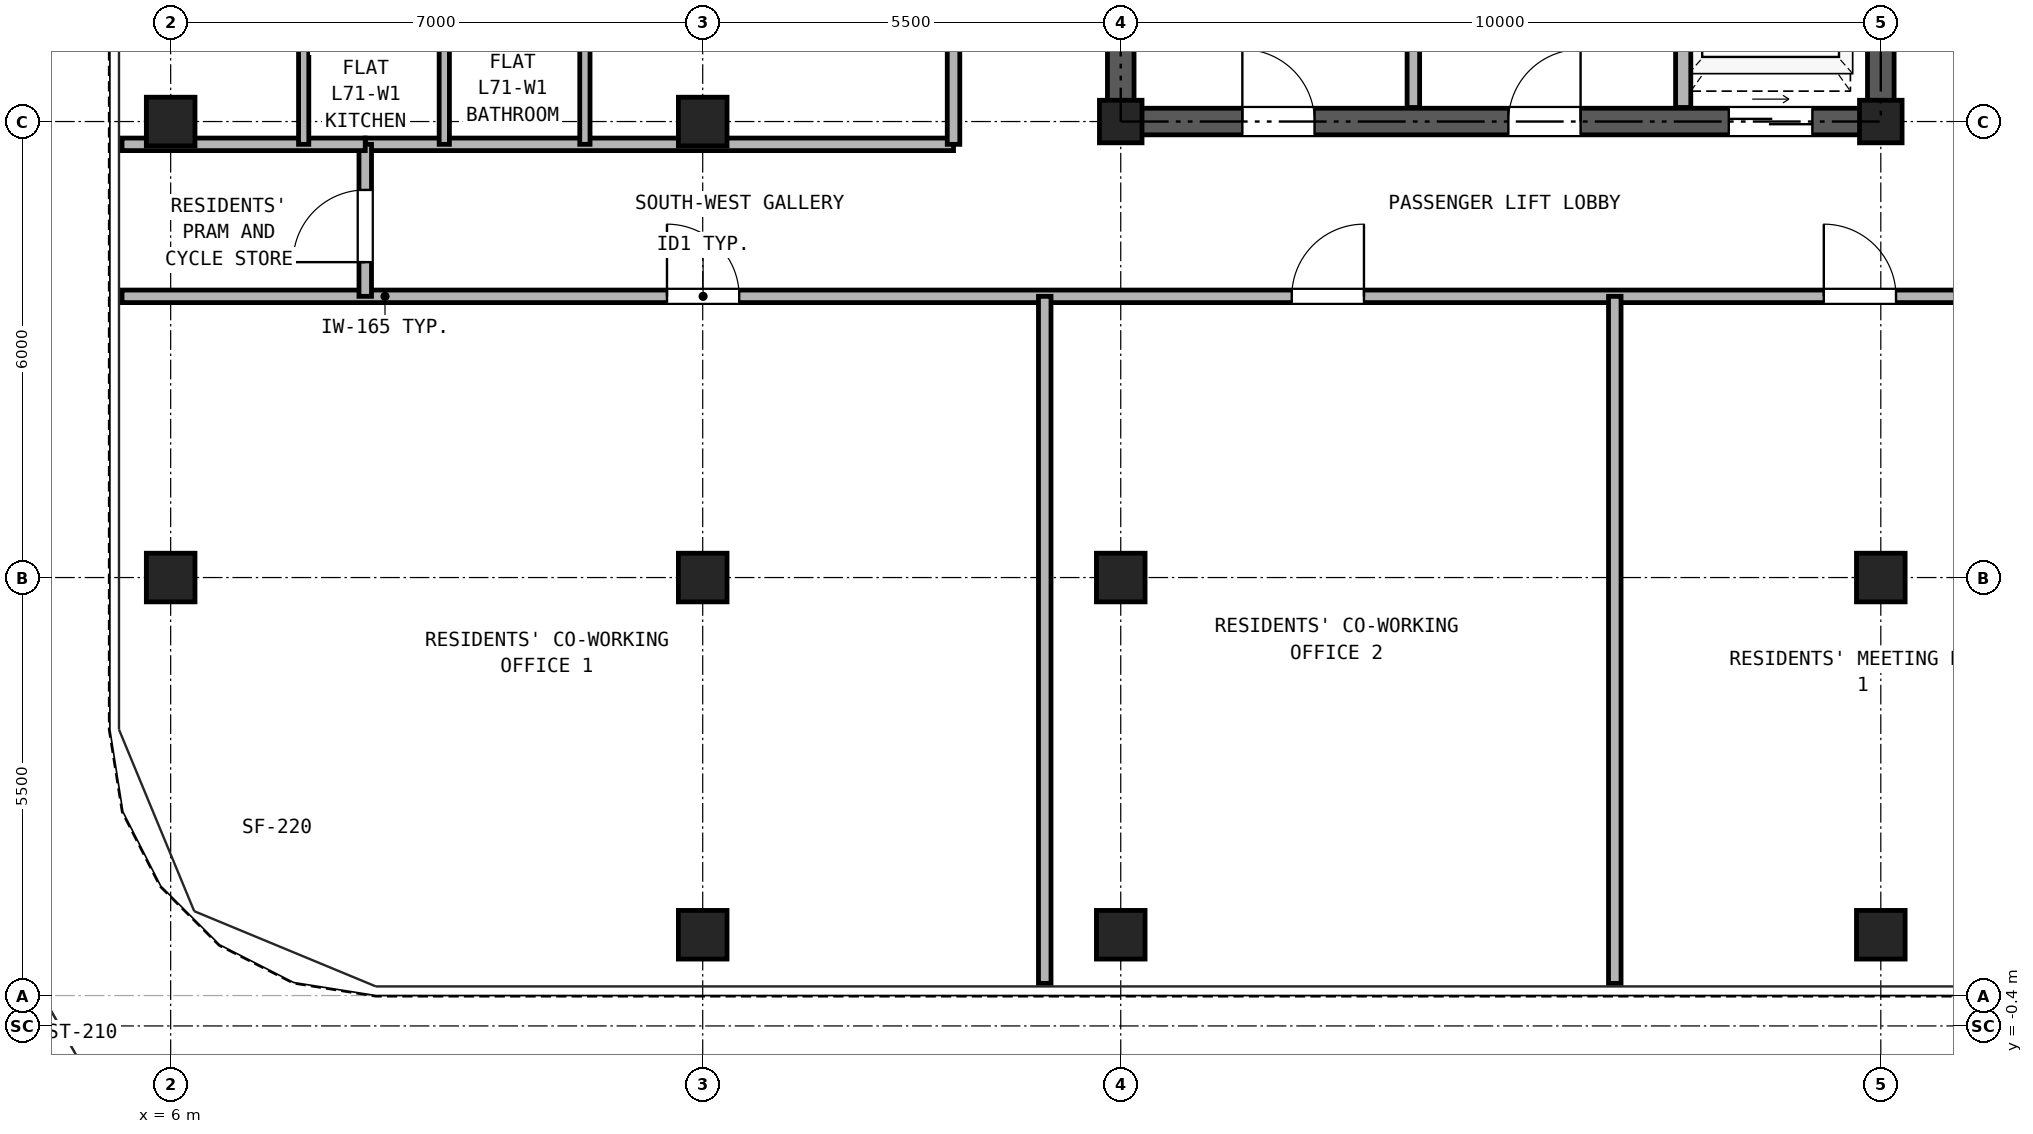
"""IFC4 building model, lengths in metres.
Left out: names, types, materials, properties, quantities, classifications, styles, units other than length and angle.
Written with IfcOpenShell. Run it as: python <this file> out.ifc"""

import sys

from ifc_helpers import new_model, si_unit, direction, frame, frame_2d, origin, origin_2d, place, context, subcontext, project, spatial, rectangle, hollow_rectangle, extrude, source, transform, mapped, element, fill, save


model = new_model("IFC4")
c1 = context("Model", 3, precision=1e-05, world=origin(), true_north=direction((0.0, 1.0)))
c2 = subcontext(c1, "Body", "Model", "MODEL_VIEW")
j1 = project(units=[si_unit("LENGTHUNIT", "METRE"), si_unit("PLANEANGLEUNIT", "RADIAN")], contexts=[c1])
p1 = place(None, origin())
s1 = spatial("IfcSite", under=j1, at=p1, CompositionType="ELEMENT")
p2 = place(p1, origin())
s2 = spatial("IfcBuilding", under=s1, at=p2, CompositionType="ELEMENT")
p3 = place(p2, frame((0.0, 0.0, 248.9)))
s3 = spatial("IfcBuildingStorey", under=s2, at=p3, CompositionType="ELEMENT", Elevation=248.9)
m1 = source(origin(), c2, "Body", "SweptSolid", [
    extrude(hollow_rectangle(XDim=0.64, YDim=0.64, WallThickness=0.035, at=origin_2d()), origin(), (0.0, 0.0, 1.0), 2.98),
])
for number, where, z_axis, x_axis in (
    (1, (13.0, 0.8, 0.0), (0.0, 0.0, 1.0), (1.0, 0.0, 0.0)),
    (2, (18.5, 0.8, 0.0), (0.0, 0.0, 1.0), (1.0, 0.0, 0.0)),
    (3, (28.5, 0.8, 0.0), (0.0, 0.0, 1.0), (1.0, 0.0, 0.0)),
    (4, (6.0, 5.5, 0.0), (0.0, 0.0, 1.0), (1.0, 0.0, 0.0)),
    (5, (6.0, 11.5, 0.0), (0.0, 0.0, 1.0), (1.0, 0.0, 0.0)),
    (6, (13.0, 5.5, 0.0), (0.0, 0.0, 1.0), (1.0, 0.0, 0.0)),
    (7, (13.0, 11.5, 0.0), (0.0, 0.0, 1.0), (1.0, 0.0, 0.0)),
    (8, (18.5, 5.5, 0.0), (0.0, 0.0, 1.0), (1.0, 0.0, 0.0)),
):
    element("IfcColumn", number, at=place(p3, frame(where, z_axis=z_axis, x_axis=x_axis)), inside=s3, PredefinedType="COLUMN", context=c2, shape_type="MappedRepresentation", body=[
        mapped(m1, transform((0.0, 0.0, 0.0), x_axis=(1.0, 0.0, 0.0), y_axis=(0.0, 1.0, 0.0), z_axis=(0.0, 0.0, 1.0), scale=1.0)),
    ])
m2 = source(origin(), c2, "Body", "SweptSolid", [
    extrude(hollow_rectangle(XDim=0.56, YDim=0.56, WallThickness=0.03, at=origin_2d()), origin(), (0.0, 0.0, 1.0), 2.98),
])
p4 = place(p3, frame((18.5, 11.5, 0.0), z_axis=(0.0, 0.0, 1.0), x_axis=(1.0, 0.0, 0.0)))
e9 = element("IfcColumn", 9, at=p4, inside=s3, PredefinedType="COLUMN", context=c2, shape_type="MappedRepresentation", body=[
    mapped(m2, transform((0.0, 0.0, 0.0), x_axis=(1.0, 0.0, 0.0), y_axis=(0.0, 1.0, 0.0), z_axis=(0.0, 0.0, 1.0), scale=1.0)),
])
p5 = place(p3, frame((28.5, 5.5, 0.0), z_axis=(0.0, 0.0, 1.0), x_axis=(1.0, 0.0, 0.0)))
e10 = element("IfcColumn", 10, at=p5, inside=s3, PredefinedType="COLUMN", context=c2, shape_type="MappedRepresentation", body=[
    mapped(m1, transform((0.0, 0.0, 0.0), x_axis=(1.0, 0.0, 0.0), y_axis=(0.0, 1.0, 0.0), z_axis=(0.0, 0.0, 1.0), scale=1.0)),
])
p6 = place(p3, frame((28.5, 11.5, 0.0), z_axis=(0.0, 0.0, 1.0), x_axis=(1.0, 0.0, 0.0)))
e11 = element("IfcColumn", 11, at=p6, inside=s3, PredefinedType="COLUMN", context=c2, shape_type="MappedRepresentation", body=[
    mapped(m2, transform((0.0, 0.0, 0.0), x_axis=(1.0, 0.0, 0.0), y_axis=(0.0, 1.0, 0.0), z_axis=(0.0, 0.0, 1.0), scale=1.0)),
])
p7 = place(p3, frame((18.325, 11.5, 0.0), z_axis=(0.0, 0.0, 1.0), x_axis=(1.0, 0.0, 0.0)))
e12 = element("IfcWall", 12, at=p7, inside=s3, PredefinedType="SHEAR", context=c2, shape_type="SweptSolid", body=[
    extrude(rectangle(XDim=10.35, YDim=0.35, at=frame_2d((5.175, 0.0))), origin(), (0.0, 0.0, 1.0), 2.98),
])
p8 = place(p7, frame((1.775, 0.0, 0.0)))
e13 = element("IfcOpeningElement", 13, at=p8, cuts=e12, PredefinedType="OPENING", context=c2, shape_type="SweptSolid", body=[
    extrude(rectangle(XDim=0.95, YDim=2.15, at=frame_2d((0.475, 1.075))), frame((0.0, 0.185, 0.0), z_axis=(0.0, -1.0, 0.0), x_axis=(1.0, 0.0, 0.0)), (0.0, 0.0, 1.0), 0.37),
])
p9 = place(p7, frame((5.275, 0.0, 0.0)))
e14 = element("IfcOpeningElement", 14, at=p9, cuts=e12, PredefinedType="OPENING", context=c2, shape_type="SweptSolid", body=[
    extrude(rectangle(XDim=0.95, YDim=2.15, at=frame_2d((0.475, 1.075))), frame((0.0, 0.185, 0.0), z_axis=(0.0, -1.0, 0.0), x_axis=(1.0, 0.0, 0.0)), (0.0, 0.0, 1.0), 0.37),
])
p10 = place(p7, frame((8.175, 0.0, 0.0)))
e15 = element("IfcOpeningElement", 15, at=p10, cuts=e12, PredefinedType="OPENING", context=c2, shape_type="SweptSolid", body=[
    extrude(rectangle(XDim=1.1, YDim=2.25, at=frame_2d((0.55, 1.125))), frame((0.0, 0.185, 0.0), z_axis=(0.0, -1.0, 0.0), x_axis=(1.0, 0.0, 0.0)), (0.0, 0.0, 1.0), 0.37),
])
p11 = place(p3, frame((18.5, 11.675, 0.0), z_axis=(0.0, 0.0, 1.0), x_axis=(0.0, 1.0, 0.0)))
e16 = element("IfcWall", 16, at=p11, inside=s3, PredefinedType="SHEAR", context=c2, shape_type="SweptSolid", body=[
    extrude(rectangle(XDim=16.9, YDim=0.35, at=frame_2d((8.45, 0.0))), origin(), (0.0, 0.0, 1.0), 2.98),
])
p12 = place(p11, frame((7.475, 0.0, 0.0)))
e17 = element("IfcOpeningElement", 17, at=p12, cuts=e16, PredefinedType="OPENING", context=c2, shape_type="SweptSolid", body=[
    extrude(rectangle(XDim=1.15, YDim=2.2, at=frame_2d((0.575, 1.1))), frame((0.0, 0.185, 0.0), z_axis=(0.0, -1.0, 0.0), x_axis=(1.0, 0.0, 0.0)), (0.0, 0.0, 1.0), 0.37),
])
p13 = place(p3, frame((28.5, 11.675, 0.0), z_axis=(0.0, 0.0, 1.0), x_axis=(0.0, 1.0, 0.0)))
e18 = element("IfcWall", 18, at=p13, inside=s3, PredefinedType="SHEAR", context=c2, shape_type="SweptSolid", body=[
    extrude(rectangle(XDim=16.9, YDim=0.35, at=frame_2d((8.45, 0.0))), origin(), (0.0, 0.0, 1.0), 2.98),
])
p14 = place(p13, frame((7.475, 0.0, 0.0)))
e19 = element("IfcOpeningElement", 19, at=p14, cuts=e18, PredefinedType="OPENING", context=c2, shape_type="SweptSolid", body=[
    extrude(rectangle(XDim=1.15, YDim=2.2, at=frame_2d((0.575, 1.1))), frame((0.0, 0.185, 0.0), z_axis=(0.0, -1.0, 0.0), x_axis=(1.0, 0.0, 0.0)), (0.0, 0.0, 1.0), 0.37),
])
p15 = place(p3, frame((22.35, 11.685, 0.0), z_axis=(0.0, 0.0, 1.0), x_axis=(0.0, 1.0, 0.0)))
e20 = element("IfcWall", 20, at=p15, inside=s3, PredefinedType="PARTITIONING", context=c2, shape_type="SweptSolid", body=[
    extrude(rectangle(XDim=3.315, YDim=0.165, at=frame_2d((1.657, 0.0))), origin(), (0.0, 0.0, 1.0), 2.98),
])
p16 = place(p3, frame((25.9, 11.685, 0.0), z_axis=(0.0, 0.0, 1.0), x_axis=(0.0, 1.0, 0.0)))
e21 = element("IfcWall", 21, at=p16, inside=s3, PredefinedType="PARTITIONING", context=c2, shape_type="SweptSolid", body=[
    extrude(rectangle(XDim=3.315, YDim=0.2, at=frame_2d((1.657, 0.0))), origin(), (0.0, 0.0, 1.0), 2.98),
])
p17 = place(p3, frame((5.36, 9.2, 0.0), z_axis=(0.0, 0.0, 1.0), x_axis=(1.0, 0.0, 0.0)))
e22 = element("IfcWall", 22, at=p17, inside=s3, PredefinedType="PARTITIONING", context=c2, shape_type="SweptSolid", body=[
    extrude(rectangle(XDim=36.28, YDim=0.165, at=frame_2d((18.14, 0.0))), origin(), (0.0, 0.0, 1.0), 2.98),
])
p18 = place(p17, frame((7.17, 0.0, 0.0)))
e23 = element("IfcOpeningElement", 23, at=p18, cuts=e22, PredefinedType="OPENING", context=c2, shape_type="SweptSolid", body=[
    extrude(rectangle(XDim=0.95, YDim=2.15, at=frame_2d((0.475, 1.075))), frame((0.0, 0.093, 0.0), z_axis=(0.0, -1.0, 0.0), x_axis=(1.0, 0.0, 0.0)), (0.0, 0.0, 1.0), 0.185),
])
p19 = place(p17, frame((15.39, 0.0, 0.0)))
e24 = element("IfcOpeningElement", 24, at=p19, cuts=e22, PredefinedType="OPENING", context=c2, shape_type="SweptSolid", body=[
    extrude(rectangle(XDim=0.95, YDim=2.15, at=frame_2d((0.475, 1.075))), frame((0.0, 0.093, 0.0), z_axis=(0.0, -1.0, 0.0), x_axis=(1.0, 0.0, 0.0)), (0.0, 0.0, 1.0), 0.185),
])
p20 = place(p17, frame((22.39, 0.0, 0.0)))
e25 = element("IfcOpeningElement", 25, at=p20, cuts=e22, PredefinedType="OPENING", context=c2, shape_type="SweptSolid", body=[
    extrude(rectangle(XDim=0.95, YDim=2.15, at=frame_2d((0.475, 1.075))), frame((0.0, 0.093, 0.0), z_axis=(0.0, -1.0, 0.0), x_axis=(1.0, 0.0, 0.0)), (0.0, 0.0, 1.0), 0.185),
])
p21 = place(p17, frame((28.99, 0.0, 0.0)))
e26 = element("IfcOpeningElement", 26, at=p21, cuts=e22, PredefinedType="OPENING", context=c2, shape_type="SweptSolid", body=[
    extrude(rectangle(XDim=0.95, YDim=2.15, at=frame_2d((0.475, 1.075))), frame((0.0, 0.093, 0.0), z_axis=(0.0, -1.0, 0.0), x_axis=(1.0, 0.0, 0.0)), (0.0, 0.0, 1.0), 0.185),
])
p22 = place(p3, frame((8.56, 11.2, 0.0), z_axis=(0.0, 0.0, 1.0), x_axis=(1.0, 0.0, 0.0)))
e27 = element("IfcWall", 27, at=p22, inside=s3, PredefinedType="PARTITIONING", context=c2, shape_type="SweptSolid", body=[
    extrude(rectangle(XDim=7.74, YDim=0.165, at=frame_2d((3.87, 0.0))), origin(), (0.0, 0.0, 1.0), 2.98),
])
p23 = place(p3, frame((8.56, 9.2, 0.0), z_axis=(0.0, 0.0, 1.0), x_axis=(0.0, 1.0, 0.0)))
e28 = element("IfcWall", 28, at=p23, inside=s3, PredefinedType="PARTITIONING", context=c2, shape_type="SweptSolid", body=[
    extrude(rectangle(XDim=2.0, YDim=0.165, at=frame_2d((1.0, 0.0))), origin(), (0.0, 0.0, 1.0), 2.98),
])
p24 = place(p23, frame((0.45, 0.0, 0.0)))
e29 = element("IfcOpeningElement", 29, at=p24, cuts=e28, PredefinedType="OPENING", context=c2, shape_type="SweptSolid", body=[
    extrude(rectangle(XDim=0.95, YDim=2.15, at=frame_2d((0.475, 1.075))), frame((0.0, 0.093, 0.0), z_axis=(0.0, -1.0, 0.0), x_axis=(1.0, 0.0, 0.0)), (0.0, 0.0, 1.0), 0.185),
])
p25 = place(p3, frame((16.3, 11.2, 0.0), z_axis=(0.0, 0.0, 1.0), x_axis=(0.0, 1.0, 0.0)))
e30 = element("IfcWall", 30, at=p25, inside=s3, PredefinedType="PARTITIONING", context=c2, shape_type="SweptSolid", body=[
    extrude(rectangle(XDim=23.94, YDim=0.165, at=frame_2d((11.97, 0.0))), origin(), (0.0, 0.0, 1.0), 2.98),
])
p26 = place(p25, frame((5.15, 0.0, 0.0)))
e31 = element("IfcOpeningElement", 31, at=p26, cuts=e30, PredefinedType="OPENING", context=c2, shape_type="SweptSolid", body=[
    extrude(rectangle(XDim=1.0, YDim=2.15, at=frame_2d((0.5, 1.075))), frame((0.0, 0.093, 0.0), z_axis=(0.0, -1.0, 0.0), x_axis=(1.0, 0.0, 0.0)), (0.0, 0.0, 1.0), 0.185),
])
p27 = place(p25, frame((14.7, 0.0, 0.0)))
e32 = element("IfcOpeningElement", 32, at=p27, cuts=e30, PredefinedType="OPENING", context=c2, shape_type="SweptSolid", body=[
    extrude(rectangle(XDim=1.0, YDim=2.15, at=frame_2d((0.5, 1.075))), frame((0.0, 0.093, 0.0), z_axis=(0.0, -1.0, 0.0), x_axis=(1.0, 0.0, 0.0)), (0.0, 0.0, 1.0), 0.185),
])
for number, where, z_axis, x_axis in (
    (33, (17.5, 0.16, 0.0), (0.0, 0.0, 1.0), (0.0, 1.0, 0.0)),
    (34, (25.0, 0.16, 0.0), (0.0, 0.0, 1.0), (0.0, 1.0, 0.0)),
):
    element("IfcWall", number, at=place(p3, frame(where, z_axis=z_axis, x_axis=x_axis)), inside=s3, PredefinedType="PARTITIONING", context=c2, shape_type="SweptSolid", body=[
        extrude(rectangle(XDim=9.04, YDim=0.165, at=frame_2d((4.52, 0.0))), origin(), (0.0, 0.0, 1.0), 2.98),
    ])
p28 = place(p3, frame((5.36, 11.2, 0.0), z_axis=(0.0, 0.0, 1.0), x_axis=(1.0, 0.0, 0.0)))
e35 = element("IfcWall", 35, at=p28, inside=s3, PredefinedType="PARTITIONING", context=c2, shape_type="SweptSolid", body=[
    extrude(rectangle(XDim=3.2, YDim=0.165, at=frame_2d((1.6, 0.0))), origin(), (0.0, 0.0, 1.0), 2.98),
])
for number, where, z_axis, x_axis in (
    (36, (7.75, 11.2, 0.0), (0.0, 0.0, 1.0), (0.0, 1.0, 0.0)),
    (37, (9.6, 11.2, 0.0), (0.0, 0.0, 1.0), (0.0, 1.0, 0.0)),
    (38, (11.45, 11.2, 0.0), (0.0, 0.0, 1.0), (0.0, 1.0, 0.0)),
):
    element("IfcWall", number, at=place(p3, frame(where, z_axis=z_axis, x_axis=x_axis)), inside=s3, PredefinedType="PARTITIONING", context=c2, shape_type="SweptSolid", body=[
        extrude(rectangle(XDim=2.15, YDim=0.135, at=frame_2d((1.075, 0.0))), origin(), (0.0, 0.0, 1.0), 2.98),
    ])
p29 = place(p8, frame((0.95, 0.0, 0.0), z_axis=(0.0, 0.0, 1.0), x_axis=(-1.0, 0.0, 0.0)))
e39 = element("IfcDoor", 39, at=p29, inside=s3, OperationType="SINGLE_SWING_LEFT", PredefinedType="DOOR", context=c2, shape_type="SweptSolid", body=[
    extrude(rectangle(XDim=0.95, YDim=2.15, at=frame_2d((0.475, 1.075))), frame((0.0, 0.025, 0.0), z_axis=(0.0, -1.0, 0.0), x_axis=(1.0, 0.0, 0.0)), (0.0, 0.0, 1.0), 0.05),
])
fill(e13, e39)
p30 = place(p9, frame((0.95, 0.0, 0.0), z_axis=(0.0, 0.0, 1.0), x_axis=(-1.0, 0.0, 0.0)))
e40 = element("IfcDoor", 40, at=p30, inside=s3, OperationType="SINGLE_SWING_RIGHT", PredefinedType="DOOR", context=c2, shape_type="SweptSolid", body=[
    extrude(rectangle(XDim=0.95, YDim=2.15, at=frame_2d((0.475, 1.075))), frame((0.0, 0.025, 0.0), z_axis=(0.0, -1.0, 0.0), x_axis=(1.0, 0.0, 0.0)), (0.0, 0.0, 1.0), 0.05),
])
fill(e14, e40)
p31 = place(p10, frame((1.1, 0.0, 0.0), z_axis=(0.0, 0.0, 1.0), x_axis=(-1.0, 0.0, 0.0)))
e41 = element("IfcDoor", 41, at=p31, inside=s3, OperationType="DOUBLE_DOOR_SLIDING", PredefinedType="DOOR", context=c2, shape_type="SweptSolid", body=[
    extrude(rectangle(XDim=1.1, YDim=2.25, at=frame_2d((0.55, 1.125))), frame((0.0, 0.025, 0.0), z_axis=(0.0, -1.0, 0.0), x_axis=(1.0, 0.0, 0.0)), (0.0, 0.0, 1.0), 0.05),
])
fill(e15, e41)
p32 = place(p18, frame((0.95, 0.0, 0.0), z_axis=(0.0, 0.0, 1.0), x_axis=(-1.0, 0.0, 0.0)))
e42 = element("IfcDoor", 42, at=p32, inside=s3, OperationType="SINGLE_SWING_LEFT", PredefinedType="DOOR", context=c2, shape_type="SweptSolid", body=[
    extrude(rectangle(XDim=0.95, YDim=2.15, at=frame_2d((0.475, 1.075))), frame((0.0, 0.025, 0.0), z_axis=(0.0, -1.0, 0.0), x_axis=(1.0, 0.0, 0.0)), (0.0, 0.0, 1.0), 0.05),
])
fill(e23, e42)
p33 = place(p19, frame((0.95, 0.0, 0.0), z_axis=(0.0, 0.0, 1.0), x_axis=(-1.0, 0.0, 0.0)))
e43 = element("IfcDoor", 43, at=p33, inside=s3, OperationType="SINGLE_SWING_RIGHT", PredefinedType="DOOR", context=c2, shape_type="SweptSolid", body=[
    extrude(rectangle(XDim=0.95, YDim=2.15, at=frame_2d((0.475, 1.075))), frame((0.0, 0.025, 0.0), z_axis=(0.0, -1.0, 0.0), x_axis=(1.0, 0.0, 0.0)), (0.0, 0.0, 1.0), 0.05),
])
fill(e24, e43)
p34 = place(p20, frame((0.95, 0.0, 0.0), z_axis=(0.0, 0.0, 1.0), x_axis=(-1.0, 0.0, 0.0)))
e44 = element("IfcDoor", 44, at=p34, inside=s3, OperationType="SINGLE_SWING_LEFT", PredefinedType="DOOR", context=c2, shape_type="SweptSolid", body=[
    extrude(rectangle(XDim=0.95, YDim=2.15, at=frame_2d((0.475, 1.075))), frame((0.0, 0.025, 0.0), z_axis=(0.0, -1.0, 0.0), x_axis=(1.0, 0.0, 0.0)), (0.0, 0.0, 1.0), 0.05),
])
fill(e25, e44)
p35 = place(p24, frame((0.95, 0.0, 0.0), z_axis=(0.0, 0.0, 1.0), x_axis=(-1.0, 0.0, 0.0)))
e45 = element("IfcDoor", 45, at=p35, inside=s3, OperationType="SINGLE_SWING_LEFT", PredefinedType="DOOR", context=c2, shape_type="SweptSolid", body=[
    extrude(rectangle(XDim=0.95, YDim=2.15, at=frame_2d((0.475, 1.075))), frame((0.0, 0.025, 0.0), z_axis=(0.0, -1.0, 0.0), x_axis=(1.0, 0.0, 0.0)), (0.0, 0.0, 1.0), 0.05),
])
fill(e29, e45)
save(model, sys.argv[1])
